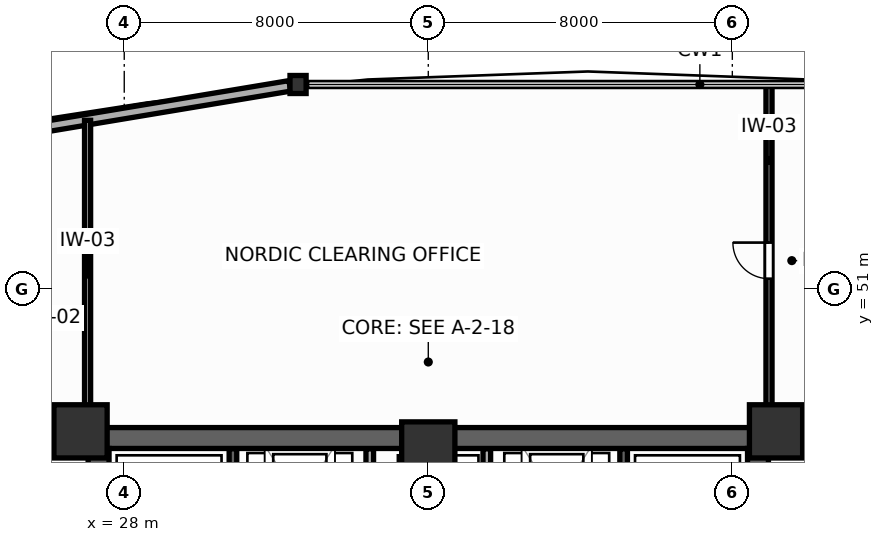
"""IFC4 building model, lengths in metres.
Left out: names, types, materials, properties, quantities, classifications, styles, units other than length and angle.
Written with IfcOpenShell. Run it as: python <this file> out.ifc"""

import sys

from ifc_helpers import new_model, si_unit, direction, frame, frame_2d, origin, origin_2d, place, context, subcontext, project, spatial, rectangle, i_section, extrude, source, transform, mapped, element, fill, save


model = new_model("IFC4")
c1 = context("Model", 3, precision=1e-05, world=origin(), true_north=direction((0.0, 1.0)))
c2 = subcontext(c1, "Body", "Model", "MODEL_VIEW")
j1 = project(units=[si_unit("LENGTHUNIT", "METRE"), si_unit("PLANEANGLEUNIT", "RADIAN")], contexts=[c1])
p1 = place(None, origin())
s1 = spatial("IfcSite", under=j1, at=p1, CompositionType="ELEMENT")
p2 = place(p1, origin())
s2 = spatial("IfcBuilding", under=s1, at=p2, CompositionType="ELEMENT")
p3 = place(p2, frame((0.0, 0.0, 67.8)))
s3 = spatial("IfcBuildingStorey", under=s2, at=p3, CompositionType="ELEMENT", Elevation=67.8)
p4 = place(p3, frame((27.05, 47.075, 0.0), z_axis=(0.0, 0.0, 1.0), x_axis=(1.0, 0.0, 0.0)))
e1 = element("IfcWall", 1, at=p4, inside=s3, PredefinedType="SHEAR", context=c2, shape_type="SweptSolid", body=[
    extrude(rectangle(XDim=17.9, YDim=0.55, at=frame_2d((8.95, 0.0))), origin(), (0.0, 0.0, 1.0), 3.9),
])
for number, where, z_axis, x_axis in (
    (2, (27.325, 37.8, 0.0), (0.0, 0.0, 1.0), (0.0, 1.0, 0.0)),
    (3, (44.675, 37.8, 0.0), (0.0, 0.0, 1.0), (0.0, 1.0, 0.0)),
):
    element("IfcWall", number, at=place(p3, frame(where, z_axis=z_axis, x_axis=x_axis)), inside=s3, PredefinedType="SHEAR", context=c2, shape_type="SweptSolid", body=[
        extrude(rectangle(XDim=9.0, YDim=0.55, at=frame_2d((4.5, 0.0))), origin(), (0.0, 0.0, 1.0), 3.9),
    ])
m1 = source(origin(), c2, "Body", "SweptSolid", [
    extrude(rectangle(XDim=1.4, YDim=1.4, at=origin_2d()), origin(), (0.0, 0.0, 1.0), 3.9),
])
for number, where, z_axis, x_axis in (
    (4, (26.85, 47.25, 0.0), (0.0, 0.0, 1.0), (1.0, 0.0, 0.0)),
    (5, (45.15, 47.25, 0.0), (0.0, 0.0, 1.0), (1.0, 0.0, 0.0)),
    (6, (36.0, 46.8, 0.0), (0.0, 0.0, 1.0), (1.0, 0.0, 0.0)),
):
    element("IfcColumn", number, at=place(p3, frame(where, z_axis=z_axis, x_axis=x_axis)), inside=s3, PredefinedType="COLUMN", context=c2, shape_type="MappedRepresentation", body=[
        mapped(m1, transform((0.0, 0.0, 0.0), scale=1.0)),
    ])
m2 = source(origin(), c2, "Body", "SweptSolid", [
    extrude(i_section(OverallWidth=0.424, OverallDepth=0.474, WebThickness=0.045, FlangeThickness=0.072, FilletRadius=0.015, at=origin_2d()), origin(), (0.0, 0.0, 1.0), 3.9),
])
p5 = place(p3, frame((32.573, 56.377, 0.0), z_axis=(0.0, 0.0, 1.0), x_axis=(1.0, 0.0, 0.0)))
e7 = element("IfcColumn", 7, at=p5, inside=s3, PredefinedType="COLUMN", context=c2, shape_type="MappedRepresentation", body=[
    mapped(m2, transform((0.0, 0.0, 0.0), scale=1.0)),
])
p6 = place(p3, frame((32.356, 56.341, 0.0), z_axis=(0.0, 0.0, 1.0), x_axis=(-0.986399895449, -0.16436315359, 0.0)))
e8 = element("IfcWall", 8, at=p6, inside=s3, PredefinedType="SOLIDWALL", context=c2, shape_type="SweptSolid", body=[
    extrude(rectangle(XDim=17.677, YDim=0.28, at=frame_2d((8.839, 0.0))), origin(), (0.0, 0.0, 1.0), 3.23),
])
p7 = place(p6, frame((7.989, 0.0, 0.75)))
e9 = element("IfcOpeningElement", 9, at=p7, cuts=e8, PredefinedType="OPENING", context=c2, shape_type="SweptSolid", body=[
    extrude(rectangle(XDim=1.7, YDim=1.75, at=frame_2d((0.85, 0.875))), frame((0.0, 0.15, 0.0), z_axis=(0.0, -1.0, 0.0), x_axis=(1.0, 0.0, 0.0)), (0.0, 0.0, 1.0), 0.3),
])
p8 = place(p3, frame((30.86, 37.81, 0.0), z_axis=(0.0, 0.0, 1.0), x_axis=(0.0, 1.0, 0.0)))
e10 = element("IfcWall", 10, at=p8, inside=s3, PredefinedType="SHEAR", context=c2, shape_type="SweptSolid", body=[
    extrude(rectangle(XDim=8.98, YDim=0.2, at=frame_2d((4.49, 0.0))), origin(), (0.0, 0.0, 1.0), 3.9),
])
p9 = place(p8, frame((0.82, 0.0, 0.0)))
e11 = element("IfcOpeningElement", 11, at=p9, cuts=e10, PredefinedType="OPENING", context=c2, shape_type="SweptSolid", body=[
    extrude(rectangle(XDim=1.05, YDim=2.1, at=frame_2d((0.525, 1.05))), frame((0.0, 0.11, 0.0), z_axis=(0.0, -1.0, 0.0), x_axis=(1.0, 0.0, 0.0)), (0.0, 0.0, 1.0), 0.22),
])
p10 = place(p3, frame((41.14, 37.81, 0.0), z_axis=(0.0, 0.0, 1.0), x_axis=(0.0, 1.0, 0.0)))
e12 = element("IfcWall", 12, at=p10, inside=s3, PredefinedType="SHEAR", context=c2, shape_type="SweptSolid", body=[
    extrude(rectangle(XDim=8.98, YDim=0.2, at=frame_2d((4.49, 0.0))), origin(), (0.0, 0.0, 1.0), 3.9),
])
p11 = place(p10, frame((0.82, 0.0, 0.0)))
e13 = element("IfcOpeningElement", 13, at=p11, cuts=e12, PredefinedType="OPENING", context=c2, shape_type="SweptSolid", body=[
    extrude(rectangle(XDim=1.05, YDim=2.1, at=frame_2d((0.525, 1.05))), frame((0.0, 0.11, 0.0), z_axis=(0.0, -1.0, 0.0), x_axis=(1.0, 0.0, 0.0)), (0.0, 0.0, 1.0), 0.22),
])
p12 = place(p3, frame((34.46, 37.81, 0.0), z_axis=(0.0, 0.0, 1.0), x_axis=(0.0, 1.0, 0.0)))
e14 = element("IfcWall", 14, at=p12, inside=s3, PredefinedType="PARTITIONING", context=c2, shape_type="SweptSolid", body=[
    extrude(rectangle(XDim=8.98, YDim=0.2, at=frame_2d((4.49, 0.0))), origin(), (0.0, 0.0, 1.0), 3.68),
])
p13 = place(p12, frame((0.65, 0.0, 0.0)))
e15 = element("IfcOpeningElement", 15, at=p13, cuts=e14, PredefinedType="OPENING", context=c2, shape_type="SweptSolid", body=[
    extrude(rectangle(XDim=0.85, YDim=2.05, at=frame_2d((0.425, 1.025))), frame((0.0, 0.11, 0.0), z_axis=(0.0, -1.0, 0.0), x_axis=(1.0, 0.0, 0.0)), (0.0, 0.0, 1.0), 0.22),
])
p14 = place(p3, frame((37.54, 37.81, 0.0), z_axis=(0.0, 0.0, 1.0), x_axis=(0.0, 1.0, 0.0)))
e16 = element("IfcWall", 16, at=p14, inside=s3, PredefinedType="PARTITIONING", context=c2, shape_type="SweptSolid", body=[
    extrude(rectangle(XDim=8.98, YDim=0.2, at=frame_2d((4.49, 0.0))), origin(), (0.0, 0.0, 1.0), 3.68),
])
p15 = place(p14, frame((0.65, 0.0, 0.0)))
e17 = element("IfcOpeningElement", 17, at=p15, cuts=e16, PredefinedType="OPENING", context=c2, shape_type="SweptSolid", body=[
    extrude(rectangle(XDim=0.85, YDim=2.05, at=frame_2d((0.425, 1.025))), frame((0.0, 0.11, 0.0), z_axis=(0.0, -1.0, 0.0), x_axis=(1.0, 0.0, 0.0)), (0.0, 0.0, 1.0), 0.22),
])
p16 = place(p3, frame((44.965, 47.34, 0.0), z_axis=(0.0, 0.0, 1.0), x_axis=(0.0, 1.0, 0.0)))
e18 = element("IfcWall", 18, at=p16, inside=s3, PredefinedType="PARTITIONING", context=c2, shape_type="SweptSolid", body=[
    extrude(rectangle(XDim=9.017, YDim=0.16, at=frame_2d((4.508, 0.0))), origin(), (0.0, 0.0, 1.0), 3.68),
])
p17 = place(p16, frame((3.927, 0.0, 0.0)))
e19 = element("IfcOpeningElement", 19, at=p17, cuts=e18, PredefinedType="OPENING", context=c2, shape_type="SweptSolid", body=[
    extrude(rectangle(XDim=0.95, YDim=2.05, at=frame_2d((0.475, 1.025))), frame((0.0, 0.09, 0.0), z_axis=(0.0, -1.0, 0.0), x_axis=(1.0, 0.0, 0.0)), (0.0, 0.0, 1.0), 0.18),
])
p18 = place(p3, frame((27.035, 47.34, 0.0), z_axis=(0.0, 0.0, 1.0), x_axis=(0.0, 1.0, 0.0)))
e20 = element("IfcWall", 20, at=p18, inside=s3, PredefinedType="PARTITIONING", context=c2, shape_type="SweptSolid", body=[
    extrude(rectangle(XDim=8.094, YDim=0.16, at=frame_2d((4.047, 0.0))), origin(), (0.0, 0.0, 1.0), 3.68),
])
p19 = place(p17, origin())
e21 = element("IfcDoor", 21, at=p19, inside=s3, OperationType="SINGLE_SWING_RIGHT", PredefinedType="DOOR", context=c2, shape_type="SweptSolid", body=[
    extrude(rectangle(XDim=0.95, YDim=2.05, at=frame_2d((0.475, 1.025))), frame((0.0, 0.025, 0.0), z_axis=(0.0, -1.0, 0.0), x_axis=(1.0, 0.0, 0.0)), (0.0, 0.0, 1.0), 0.05),
])
fill(e19, e21)
save(model, sys.argv[1])
